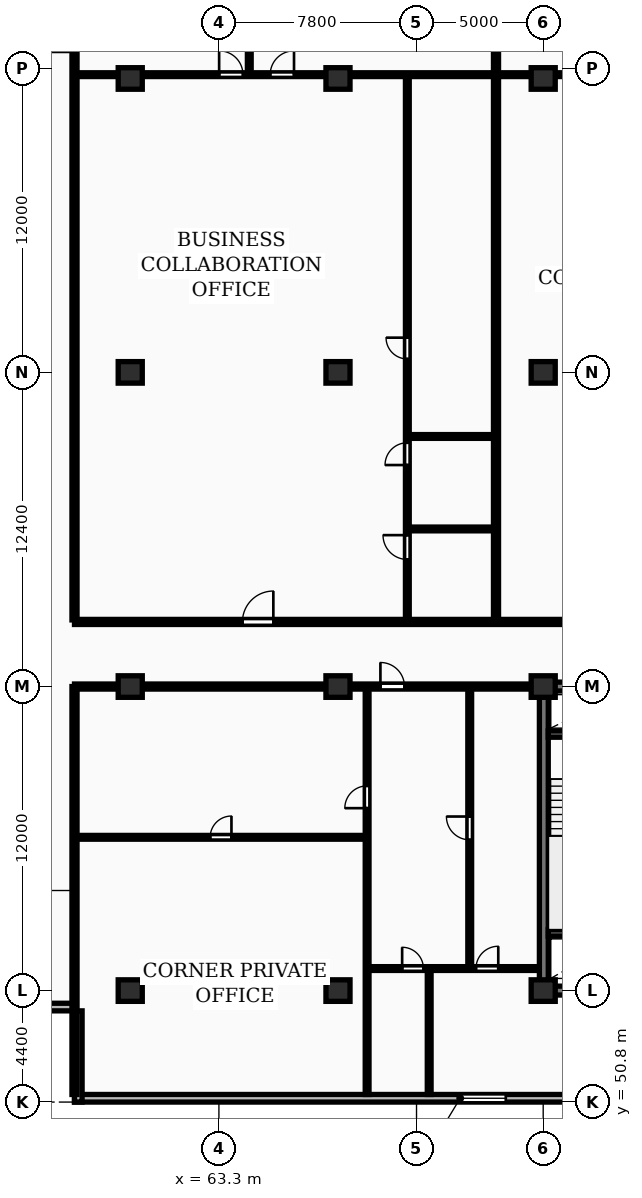
"""IFC4 building model, lengths in metres.
Left out: names, types, materials, properties, quantities, classifications, styles, units other than length and angle.
Written with IfcOpenShell. Run it as: python <this file> out.ifc"""

import sys

from ifc_helpers import new_model, si_unit, direction, frame, frame_2d, origin, origin_2d, place, context, subcontext, project, spatial, rectangle, extrude, element, fill, save


model = new_model("IFC4")
c1 = context("Model", 3, precision=1e-05, world=origin(), true_north=direction((0.0, 1.0)))
c2 = subcontext(c1, "Body", "Model", "MODEL_VIEW")
j1 = project(units=[si_unit("LENGTHUNIT", "METRE"), si_unit("PLANEANGLEUNIT", "RADIAN")], contexts=[c1])
p1 = place(None, origin())
s1 = spatial("IfcSite", under=j1, at=p1, CompositionType="ELEMENT")
p2 = place(p1, origin())
s2 = spatial("IfcBuilding", under=s1, at=p2, CompositionType="ELEMENT")
p3 = place(p2, frame((0.0, 0.0, 132.8)))
s3 = spatial("IfcBuildingStorey", under=s2, at=p3, CompositionType="ELEMENT", Elevation=132.8)
for number, where, z_axis, x_axis in (
    (1, (59.8, 55.2, 0.0), (0.0, 0.0, 1.0), (1.0, 0.0, 0.0)),
    (2, (59.8, 67.2, 0.0), (0.0, 0.0, 1.0), (1.0, 0.0, 0.0)),
    (3, (59.8, 79.6, 0.0), (0.0, 0.0, 1.0), (1.0, 0.0, 0.0)),
    (4, (59.8, 91.2, 0.0), (0.0, 0.0, 1.0), (1.0, 0.0, 0.0)),
    (5, (68.0, 55.2, 0.0), (0.0, 0.0, 1.0), (1.0, 0.0, 0.0)),
    (6, (68.0, 67.2, 0.0), (0.0, 0.0, 1.0), (1.0, 0.0, 0.0)),
    (7, (68.0, 79.6, 0.0), (0.0, 0.0, 1.0), (1.0, 0.0, 0.0)),
    (8, (68.0, 91.2, 0.0), (0.0, 0.0, 1.0), (1.0, 0.0, 0.0)),
    (9, (76.1, 55.2, 0.0), (0.0, 0.0, 1.0), (1.0, 0.0, 0.0)),
    (10, (76.1, 67.2, 0.0), (0.0, 0.0, 1.0), (1.0, 0.0, 0.0)),
    (11, (76.1, 79.6, 0.0), (0.0, 0.0, 1.0), (1.0, 0.0, 0.0)),
    (12, (76.1, 91.2, 0.0), (0.0, 0.0, 1.0), (1.0, 0.0, 0.0)),
):
    element("IfcColumn", number, at=place(p3, frame(where, z_axis=z_axis, x_axis=x_axis)), inside=s3, PredefinedType="COLUMN", context=c2, shape_type="SweptSolid", body=[
        extrude(rectangle(XDim=0.95, YDim=0.85, at=origin_2d()), origin(), (0.0, 0.0, 1.0), 3.25),
    ])
p4 = place(p3, frame((57.6, 50.95, 0.0), z_axis=(0.0, 0.0, 1.0), x_axis=(1.0, 0.0, 0.0)))
e13 = element("IfcWall", 13, at=p4, inside=s3, PredefinedType="STANDARD", context=c2, shape_type="SweptSolid", body=[
    extrude(rectangle(XDim=73.0, YDim=0.3, at=frame_2d((36.5, 0.0))), origin(), (0.0, 0.0, 1.0), 2.97),
])
p5 = place(p4, frame((15.225, 0.0, 0.85)))
e14 = element("IfcOpeningElement", 14, at=p5, cuts=e13, PredefinedType="OPENING", context=c2, shape_type="SweptSolid", body=[
    extrude(rectangle(XDim=1.8, YDim=1.8, at=frame_2d((0.9, 0.9))), frame((0.0, 0.16, 0.0), z_axis=(0.0, -1.0, 0.0), x_axis=(1.0, 0.0, 0.0)), (0.0, 0.0, 1.0), 0.32),
])
p6 = place(p4, frame((58.575, 0.0, 0.85)))
e15 = element("IfcOpeningElement", 15, at=p6, cuts=e13, PredefinedType="OPENING", context=c2, shape_type="SweptSolid", body=[
    extrude(rectangle(XDim=1.8, YDim=1.8, at=frame_2d((0.9, 0.9))), frame((0.0, 0.16, 0.0), z_axis=(0.0, -1.0, 0.0), x_axis=(1.0, 0.0, 0.0)), (0.0, 0.0, 1.0), 0.32),
])
p7 = place(p3, frame((54.0, 54.55, 0.0), z_axis=(0.0, 0.0, 1.0), x_axis=(1.0, 0.0, 0.0)))
e16 = element("IfcWall", 16, at=p7, inside=s3, PredefinedType="STANDARD", context=c2, shape_type="SweptSolid", body=[
    extrude(rectangle(XDim=3.6, YDim=0.3, at=frame_2d((1.8, 0.0))), origin(), (0.0, 0.0, 1.0), 2.97),
])
p8 = place(p3, frame((57.75, 54.4, 0.0), z_axis=(0.0, 0.0, 1.0), x_axis=(0.0, -1.0, 0.0)))
e17 = element("IfcWall", 17, at=p8, inside=s3, PredefinedType="STANDARD", context=c2, shape_type="SweptSolid", body=[
    extrude(rectangle(XDim=3.6, YDim=0.3, at=frame_2d((1.8, 0.0))), origin(), (0.0, 0.0, 1.0), 2.97),
])
p9 = place(p3, frame((75.95, 55.2, 0.0), z_axis=(0.0, 0.0, 1.0), x_axis=(1.0, 0.0, 0.0)))
e18 = element("IfcWall", 18, at=p9, inside=s3, PredefinedType="SHEAR", context=c2, shape_type="SweptSolid", body=[
    extrude(rectangle(XDim=36.3, YDim=0.35, at=frame_2d((18.15, 0.0))), origin(), (0.0, 0.0, 1.0), 3.25),
])
p10 = place(p3, frame((76.125, 55.375, 0.0), z_axis=(0.0, 0.0, 1.0), x_axis=(0.0, 1.0, 0.0)))
e19 = element("IfcWall", 19, at=p10, inside=s3, PredefinedType="SHEAR", context=c2, shape_type="SweptSolid", body=[
    extrude(rectangle(XDim=11.65, YDim=0.35, at=frame_2d((5.825, 0.0))), origin(), (0.0, 0.0, 1.0), 3.25),
])
p11 = place(p3, frame((75.95, 67.2, 0.0), z_axis=(0.0, 0.0, 1.0), x_axis=(1.0, 0.0, 0.0)))
e20 = element("IfcWall", 20, at=p11, inside=s3, PredefinedType="SHEAR", context=c2, shape_type="SweptSolid", body=[
    extrude(rectangle(XDim=36.3, YDim=0.35, at=frame_2d((18.15, 0.0))), origin(), (0.0, 0.0, 1.0), 3.25),
])
p12 = place(p11, frame((5.25, 0.0, 0.0)))
e21 = element("IfcOpeningElement", 21, at=p12, cuts=e20, PredefinedType="OPENING", context=c2, shape_type="SweptSolid", body=[
    extrude(rectangle(XDim=1.0, YDim=2.15, at=frame_2d((0.5, 1.075))), frame((0.0, 0.185, 0.0), z_axis=(0.0, -1.0, 0.0), x_axis=(1.0, 0.0, 0.0)), (0.0, 0.0, 1.0), 0.37),
])
p13 = place(p11, frame((21.6, 0.0, 0.0)))
e22 = element("IfcOpeningElement", 22, at=p13, cuts=e20, PredefinedType="OPENING", context=c2, shape_type="SweptSolid", body=[
    extrude(rectangle(XDim=1.5, YDim=2.2, at=frame_2d((0.75, 1.1))), frame((0.0, 0.185, 0.0), z_axis=(0.0, -1.0, 0.0), x_axis=(1.0, 0.0, 0.0)), (0.0, 0.0, 1.0), 0.37),
])
p14 = place(p11, frame((30.45, 0.0, 0.0)))
e23 = element("IfcOpeningElement", 23, at=p14, cuts=e20, PredefinedType="OPENING", context=c2, shape_type="SweptSolid", body=[
    extrude(rectangle(XDim=1.0, YDim=2.15, at=frame_2d((0.5, 1.075))), frame((0.0, 0.185, 0.0), z_axis=(0.0, -1.0, 0.0), x_axis=(1.0, 0.0, 0.0)), (0.0, 0.0, 1.0), 0.37),
])
for number, where, z_axis, x_axis in (
    (24, (76.3, 57.475, 0.0), (0.0, 0.0, 1.0), (1.0, 0.0, 0.0)),
    (25, (76.3, 65.325, 0.0), (0.0, 0.0, 1.0), (1.0, 0.0, 0.0)),
):
    element("IfcWall", number, at=place(p3, frame(where, z_axis=z_axis, x_axis=x_axis)), inside=s3, PredefinedType="SHEAR", context=c2, shape_type="SweptSolid", body=[
        extrude(rectangle(XDim=3.24, YDim=0.25, at=frame_2d((1.62, 0.0))), origin(), (0.0, 0.0, 1.0), 3.25),
    ])
p15 = place(p3, frame((57.6, 51.1, 0.0), z_axis=(0.0, 0.0, 1.0), x_axis=(0.0, 1.0, 0.0)))
e26 = element("IfcWall", 26, at=p15, inside=s3, PredefinedType="PARTITIONING", context=c2, shape_type="SweptSolid", body=[
    extrude(rectangle(XDim=16.1, YDim=0.2, at=frame_2d((8.05, 0.0))), origin(), (0.0, 0.0, 1.0), 2.97),
])
p16 = place(p3, frame((57.6, 61.25, 0.0), z_axis=(0.0, 0.0, 1.0), x_axis=(1.0, 0.0, 0.0)))
e27 = element("IfcWall", 27, at=p16, inside=s3, PredefinedType="PARTITIONING", context=c2, shape_type="SweptSolid", body=[
    extrude(rectangle(XDim=11.55, YDim=0.15, at=frame_2d((5.775, 0.0))), origin(), (0.0, 0.0, 1.0), 2.97),
])
p17 = place(p16, frame((5.355, 0.0, 0.0)))
e28 = element("IfcOpeningElement", 28, at=p17, cuts=e27, PredefinedType="OPENING", context=c2, shape_type="SweptSolid", body=[
    extrude(rectangle(XDim=0.84, YDim=2.04, at=frame_2d((0.42, 1.02))), frame((0.0, 0.085, 0.0), z_axis=(0.0, -1.0, 0.0), x_axis=(1.0, 0.0, 0.0)), (0.0, 0.0, 1.0), 0.17),
])
p18 = place(p3, frame((69.15, 51.1, 0.0), z_axis=(0.0, 0.0, 1.0), x_axis=(0.0, 1.0, 0.0)))
e29 = element("IfcWall", 29, at=p18, inside=s3, PredefinedType="PARTITIONING", context=c2, shape_type="SweptSolid", body=[
    extrude(rectangle(XDim=16.05, YDim=0.15, at=frame_2d((8.025, 0.0))), origin(), (0.0, 0.0, 1.0), 2.97),
])
p19 = place(p18, frame((11.3, 0.0, 0.0)))
e30 = element("IfcOpeningElement", 30, at=p19, cuts=e29, PredefinedType="OPENING", context=c2, shape_type="SweptSolid", body=[
    extrude(rectangle(XDim=0.88, YDim=2.06, at=frame_2d((0.44, 1.03))), frame((0.0, 0.085, 0.0), z_axis=(0.0, -1.0, 0.0), x_axis=(1.0, 0.0, 0.0)), (0.0, 0.0, 1.0), 0.17),
])
p20 = place(p3, frame((73.2, 56.07, 0.0), z_axis=(0.0, 0.0, 1.0), x_axis=(0.0, 1.0, 0.0)))
e31 = element("IfcWall", 31, at=p20, inside=s3, PredefinedType="PARTITIONING", context=c2, shape_type="SweptSolid", body=[
    extrude(rectangle(XDim=11.08, YDim=0.15, at=frame_2d((5.54, 0.0))), origin(), (0.0, 0.0, 1.0), 2.97),
])
p21 = place(p20, frame((5.08, 0.0, 0.0)))
e32 = element("IfcOpeningElement", 32, at=p21, cuts=e31, PredefinedType="OPENING", context=c2, shape_type="SweptSolid", body=[
    extrude(rectangle(XDim=0.92, YDim=2.08, at=frame_2d((0.46, 1.04))), frame((0.0, 0.085, 0.0), z_axis=(0.0, -1.0, 0.0), x_axis=(1.0, 0.0, 0.0)), (0.0, 0.0, 1.0), 0.17),
])
p22 = place(p3, frame((71.6, 51.1, 0.0), z_axis=(0.0, 0.0, 1.0), x_axis=(0.0, 1.0, 0.0)))
e33 = element("IfcWall", 33, at=p22, inside=s3, PredefinedType="PARTITIONING", context=c2, shape_type="SweptSolid", body=[
    extrude(rectangle(XDim=4.97, YDim=0.15, at=frame_2d((2.485, 0.0))), origin(), (0.0, 0.0, 1.0), 2.97),
])
p23 = place(p3, frame((69.17, 56.07, 0.0), z_axis=(0.0, 0.0, 1.0), x_axis=(1.0, 0.0, 0.0)))
e34 = element("IfcWall", 34, at=p23, inside=s3, PredefinedType="PARTITIONING", context=c2, shape_type="SweptSolid", body=[
    extrude(rectangle(XDim=6.76, YDim=0.15, at=frame_2d((3.38, 0.0))), origin(), (0.0, 0.0, 1.0), 2.97),
])
p24 = place(p23, frame((1.362, 0.0, 0.0)))
e35 = element("IfcOpeningElement", 35, at=p24, cuts=e34, PredefinedType="OPENING", context=c2, shape_type="SweptSolid", body=[
    extrude(rectangle(XDim=0.84, YDim=2.04, at=frame_2d((0.42, 1.02))), frame((0.0, 0.085, 0.0), z_axis=(0.0, -1.0, 0.0), x_axis=(1.0, 0.0, 0.0)), (0.0, 0.0, 1.0), 0.17),
])
p25 = place(p23, frame((4.277, 0.0, 0.0)))
e36 = element("IfcOpeningElement", 36, at=p25, cuts=e34, PredefinedType="OPENING", context=c2, shape_type="SweptSolid", body=[
    extrude(rectangle(XDim=0.88, YDim=2.06, at=frame_2d((0.44, 1.03))), frame((0.0, 0.085, 0.0), z_axis=(0.0, -1.0, 0.0), x_axis=(1.0, 0.0, 0.0)), (0.0, 0.0, 1.0), 0.17),
])
p26 = place(p3, frame((57.6, 67.2, 0.0), z_axis=(0.0, 0.0, 1.0), x_axis=(1.0, 0.0, 0.0)))
e37 = element("IfcWall", 37, at=p26, inside=s3, PredefinedType="PARTITIONING", context=c2, shape_type="SweptSolid", body=[
    extrude(rectangle(XDim=18.35, YDim=0.2, at=frame_2d((9.175, 0.0))), origin(), (0.0, 0.0, 1.0), 2.433),
])
p27 = place(p26, frame((12.075, 0.0, 0.0)))
e38 = element("IfcOpeningElement", 38, at=p27, cuts=e37, PredefinedType="OPENING", context=c2, shape_type="SweptSolid", body=[
    extrude(rectangle(XDim=0.95, YDim=2.15, at=frame_2d((0.475, 1.075))), frame((0.0, 0.11, 0.0), z_axis=(0.0, -1.0, 0.0), x_axis=(1.0, 0.0, 0.0)), (0.0, 0.0, 1.0), 0.22),
])
for number, where, z_axis, x_axis in (
    (39, (57.6, 69.83, 0.0), (0.0, 0.0, 1.0), (0.0, 1.0, 0.0)),
    (40, (74.238, 69.83, 0.0), (0.0, 0.0, 1.0), (0.0, 1.0, 0.0)),
):
    element("IfcWall", number, at=place(p3, frame(where, z_axis=z_axis, x_axis=x_axis)), inside=s3, PredefinedType="PARTITIONING", context=c2, shape_type="SweptSolid", body=[
        extrude(rectangle(XDim=26.07, YDim=0.2, at=frame_2d((13.035, 0.0))), origin(), (0.0, 0.0, 1.0), 2.97),
    ])
for number, where, z_axis, x_axis in (
    (41, (70.798, 73.42, 0.0), (0.0, 0.0, 1.0), (1.0, 0.0, 0.0)),
    (42, (70.798, 77.07, 0.0), (0.0, 0.0, 1.0), (1.0, 0.0, 0.0)),
):
    element("IfcWall", number, at=place(p3, frame(where, z_axis=z_axis, x_axis=x_axis)), inside=s3, PredefinedType="PARTITIONING", context=c2, shape_type="SweptSolid", body=[
        extrude(rectangle(XDim=3.36, YDim=0.15, at=frame_2d((1.68, 0.0))), origin(), (0.0, 0.0, 1.0), 2.97),
    ])
p28 = place(p3, frame((70.738, 69.81, 0.0), z_axis=(0.0, 0.0, 1.0), x_axis=(0.0, 1.0, 0.0)))
e43 = element("IfcWall", 43, at=p28, inside=s3, PredefinedType="PARTITIONING", context=c2, shape_type="SweptSolid", body=[
    extrude(rectangle(XDim=21.48, YDim=0.15, at=frame_2d((10.74, 0.0))), origin(), (0.0, 0.0, 1.0), 2.97),
])
p29 = place(p28, frame((2.406, 0.0, 0.0)))
e44 = element("IfcOpeningElement", 44, at=p29, cuts=e43, PredefinedType="OPENING", context=c2, shape_type="SweptSolid", body=[
    extrude(rectangle(XDim=0.96, YDim=2.1, at=frame_2d((0.48, 1.05))), frame((0.0, 0.085, 0.0), z_axis=(0.0, -1.0, 0.0), x_axis=(1.0, 0.0, 0.0)), (0.0, 0.0, 1.0), 0.17),
])
p30 = place(p28, frame((6.133, 0.0, 0.0)))
e45 = element("IfcOpeningElement", 45, at=p30, cuts=e43, PredefinedType="OPENING", context=c2, shape_type="SweptSolid", body=[
    extrude(rectangle(XDim=0.88, YDim=2.06, at=frame_2d((0.44, 1.03))), frame((0.0, 0.085, 0.0), z_axis=(0.0, -1.0, 0.0), x_axis=(1.0, 0.0, 0.0)), (0.0, 0.0, 1.0), 0.17),
])
p31 = place(p28, frame((10.32, 0.0, 0.0)))
e46 = element("IfcOpeningElement", 46, at=p31, cuts=e43, PredefinedType="OPENING", context=c2, shape_type="SweptSolid", body=[
    extrude(rectangle(XDim=0.84, YDim=2.04, at=frame_2d((0.42, 1.02))), frame((0.0, 0.085, 0.0), z_axis=(0.0, -1.0, 0.0), x_axis=(1.0, 0.0, 0.0)), (0.0, 0.0, 1.0), 0.17),
])
p32 = place(p3, frame((64.499, 91.43, 0.0), z_axis=(0.0, 0.0, 1.0), x_axis=(0.0, 1.0, 0.0)))
e47 = element("IfcWall", 47, at=p32, inside=s3, PredefinedType="PARTITIONING", context=c2, shape_type="SweptSolid", body=[
    extrude(rectangle(XDim=4.47, YDim=0.15, at=frame_2d((2.235, 0.0))), origin(), (0.0, 0.0, 1.0), 2.97),
])
p33 = place(p3, frame((57.68, 91.35, 0.0), z_axis=(0.0, 0.0, 1.0), x_axis=(1.0, 0.0, 0.0)))
e48 = element("IfcWall", 48, at=p33, inside=s3, PredefinedType="PARTITIONING", context=c2, shape_type="SweptSolid", body=[
    extrude(rectangle(XDim=16.478, YDim=0.15, at=frame_2d((8.239, 0.0))), origin(), (0.0, 0.0, 1.0), 2.663),
])
p34 = place(p33, frame((5.629, 0.0, 0.0)))
e49 = element("IfcOpeningElement", 49, at=p34, cuts=e48, PredefinedType="OPENING", context=c2, shape_type="SweptSolid", body=[
    extrude(rectangle(XDim=0.94, YDim=2.1, at=frame_2d((0.47, 1.05))), frame((0.0, 0.085, 0.0), z_axis=(0.0, -1.0, 0.0), x_axis=(1.0, 0.0, 0.0)), (0.0, 0.0, 1.0), 0.17),
])
p35 = place(p33, frame((7.645, 0.0, 0.0)))
e50 = element("IfcOpeningElement", 50, at=p35, cuts=e48, PredefinedType="OPENING", context=c2, shape_type="SweptSolid", body=[
    extrude(rectangle(XDim=0.94, YDim=2.1, at=frame_2d((0.47, 1.05))), frame((0.0, 0.085, 0.0), z_axis=(0.0, -1.0, 0.0), x_axis=(1.0, 0.0, 0.0)), (0.0, 0.0, 1.0), 0.17),
])
p36 = place(p3, frame((74.317, 91.35, 0.0), z_axis=(0.0, 0.0, 1.0), x_axis=(1.0, 0.0, 0.0)))
e51 = element("IfcWall", 51, at=p36, inside=s3, PredefinedType="PARTITIONING", context=c2, shape_type="SweptSolid", body=[
    extrude(rectangle(XDim=18.44, YDim=0.15, at=frame_2d((9.22, 0.0))), origin(), (0.0, 0.0, 1.0), 2.663),
])
p37 = place(p36, frame((6.725, 0.0, 0.0)))
e52 = element("IfcOpeningElement", 52, at=p37, cuts=e51, PredefinedType="OPENING", context=c2, shape_type="SweptSolid", body=[
    extrude(rectangle(XDim=0.94, YDim=2.1, at=frame_2d((0.47, 1.05))), frame((0.0, 0.085, 0.0), z_axis=(0.0, -1.0, 0.0), x_axis=(1.0, 0.0, 0.0)), (0.0, 0.0, 1.0), 0.17),
])
p38 = place(p36, frame((11.938, 0.0, 0.0)))
e53 = element("IfcOpeningElement", 53, at=p38, cuts=e51, PredefinedType="OPENING", context=c2, shape_type="SweptSolid", body=[
    extrude(rectangle(XDim=0.94, YDim=2.1, at=frame_2d((0.47, 1.05))), frame((0.0, 0.085, 0.0), z_axis=(0.0, -1.0, 0.0), x_axis=(1.0, 0.0, 0.0)), (0.0, 0.0, 1.0), 0.17),
])
p39 = place(p3, frame((57.6, 69.75, 0.0), z_axis=(0.0, 0.0, 1.0), x_axis=(1.0, 0.0, 0.0)))
e54 = element("IfcWall", 54, at=p39, inside=s3, PredefinedType="PARTITIONING", context=c2, shape_type="SweptSolid", body=[
    extrude(rectangle(XDim=73.0, YDim=0.2, at=frame_2d((36.5, 0.0))), origin(), (0.0, 0.0, 1.0), 2.97),
])
p40 = place(p39, frame((6.629, 0.0, 0.0)))
e55 = element("IfcOpeningElement", 55, at=p40, cuts=e54, PredefinedType="OPENING", context=c2, shape_type="SweptSolid", body=[
    extrude(rectangle(XDim=1.22, YDim=2.18, at=frame_2d((0.61, 1.09))), frame((0.0, 0.11, 0.0), z_axis=(0.0, -1.0, 0.0), x_axis=(1.0, 0.0, 0.0)), (0.0, 0.0, 1.0), 0.22),
])
p41 = place(p39, frame((24.022, 0.0, 0.0)))
e56 = element("IfcOpeningElement", 56, at=p41, cuts=e54, PredefinedType="OPENING", context=c2, shape_type="SweptSolid", body=[
    extrude(rectangle(XDim=1.22, YDim=2.18, at=frame_2d((0.61, 1.09))), frame((0.0, 0.11, 0.0), z_axis=(0.0, -1.0, 0.0), x_axis=(1.0, 0.0, 0.0)), (0.0, 0.0, 1.0), 0.22),
])
p42 = place(p39, frame((37.768, 0.0, 0.0)))
e57 = element("IfcOpeningElement", 57, at=p42, cuts=e54, PredefinedType="OPENING", context=c2, shape_type="SweptSolid", body=[
    extrude(rectangle(XDim=0.95, YDim=2.15, at=frame_2d((0.475, 1.075))), frame((0.0, 0.11, 0.0), z_axis=(0.0, -1.0, 0.0), x_axis=(1.0, 0.0, 0.0)), (0.0, 0.0, 1.0), 0.22),
])
p43 = place(p39, frame((57.57, 0.0, 0.0)))
e58 = element("IfcOpeningElement", 58, at=p43, cuts=e54, PredefinedType="OPENING", context=c2, shape_type="SweptSolid", body=[
    extrude(rectangle(XDim=0.95, YDim=2.15, at=frame_2d((0.475, 1.075))), frame((0.0, 0.11, 0.0), z_axis=(0.0, -1.0, 0.0), x_axis=(1.0, 0.0, 0.0)), (0.0, 0.0, 1.0), 0.22),
])
p44 = place(p5, origin())
e59 = element("IfcWindow", 59, at=p44, inside=s3, PartitioningType="SINGLE_PANEL", PredefinedType="WINDOW", context=c2, shape_type="SweptSolid", body=[
    extrude(rectangle(XDim=1.8, YDim=1.8, at=frame_2d((0.9, 0.9))), frame((0.0, 0.03, 0.0), z_axis=(0.0, -1.0, 0.0), x_axis=(1.0, 0.0, 0.0)), (0.0, 0.0, 1.0), 0.06),
])
fill(e14, e59)
p45 = place(p17, origin())
e60 = element("IfcDoor", 60, at=p45, inside=s3, OperationType="SINGLE_SWING_RIGHT", PredefinedType="DOOR", context=c2, shape_type="SweptSolid", body=[
    extrude(rectangle(XDim=0.84, YDim=2.04, at=frame_2d((0.42, 1.02))), frame((0.0, 0.025, 0.0), z_axis=(0.0, -1.0, 0.0), x_axis=(1.0, 0.0, 0.0)), (0.0, 0.0, 1.0), 0.05),
])
fill(e28, e60)
p46 = place(p19, origin())
e61 = element("IfcDoor", 61, at=p46, inside=s3, OperationType="SINGLE_SWING_LEFT", PredefinedType="DOOR", context=c2, shape_type="SweptSolid", body=[
    extrude(rectangle(XDim=0.88, YDim=2.06, at=frame_2d((0.44, 1.03))), frame((0.0, 0.025, 0.0), z_axis=(0.0, -1.0, 0.0), x_axis=(1.0, 0.0, 0.0)), (0.0, 0.0, 1.0), 0.05),
])
fill(e30, e61)
p47 = place(p21, origin())
e62 = element("IfcDoor", 62, at=p47, inside=s3, OperationType="SINGLE_SWING_RIGHT", PredefinedType="DOOR", context=c2, shape_type="SweptSolid", body=[
    extrude(rectangle(XDim=0.92, YDim=2.08, at=frame_2d((0.46, 1.04))), frame((0.0, 0.025, 0.0), z_axis=(0.0, -1.0, 0.0), x_axis=(1.0, 0.0, 0.0)), (0.0, 0.0, 1.0), 0.05),
])
fill(e32, e62)
p48 = place(p24, origin())
e63 = element("IfcDoor", 63, at=p48, inside=s3, OperationType="SINGLE_SWING_LEFT", PredefinedType="DOOR", context=c2, shape_type="SweptSolid", body=[
    extrude(rectangle(XDim=0.84, YDim=2.04, at=frame_2d((0.42, 1.02))), frame((0.0, 0.025, 0.0), z_axis=(0.0, -1.0, 0.0), x_axis=(1.0, 0.0, 0.0)), (0.0, 0.0, 1.0), 0.05),
])
fill(e35, e63)
p49 = place(p25, origin())
e64 = element("IfcDoor", 64, at=p49, inside=s3, OperationType="SINGLE_SWING_RIGHT", PredefinedType="DOOR", context=c2, shape_type="SweptSolid", body=[
    extrude(rectangle(XDim=0.88, YDim=2.06, at=frame_2d((0.44, 1.03))), frame((0.0, 0.025, 0.0), z_axis=(0.0, -1.0, 0.0), x_axis=(1.0, 0.0, 0.0)), (0.0, 0.0, 1.0), 0.05),
])
fill(e36, e64)
p50 = place(p27, origin())
e65 = element("IfcDoor", 65, at=p50, inside=s3, OperationType="SINGLE_SWING_LEFT", PredefinedType="DOOR", context=c2, shape_type="SweptSolid", body=[
    extrude(rectangle(XDim=0.95, YDim=2.15, at=frame_2d((0.475, 1.075))), frame((0.0, 0.025, 0.0), z_axis=(0.0, -1.0, 0.0), x_axis=(1.0, 0.0, 0.0)), (0.0, 0.0, 1.0), 0.05),
])
fill(e38, e65)
p51 = place(p29, origin())
e66 = element("IfcDoor", 66, at=p51, inside=s3, OperationType="SINGLE_SWING_RIGHT", PredefinedType="DOOR", context=c2, shape_type="SweptSolid", body=[
    extrude(rectangle(XDim=0.96, YDim=2.1, at=frame_2d((0.48, 1.05))), frame((0.0, 0.025, 0.0), z_axis=(0.0, -1.0, 0.0), x_axis=(1.0, 0.0, 0.0)), (0.0, 0.0, 1.0), 0.05),
])
fill(e44, e66)
p52 = place(p30, origin())
e67 = element("IfcDoor", 67, at=p52, inside=s3, OperationType="SINGLE_SWING_LEFT", PredefinedType="DOOR", context=c2, shape_type="SweptSolid", body=[
    extrude(rectangle(XDim=0.88, YDim=2.06, at=frame_2d((0.44, 1.03))), frame((0.0, 0.025, 0.0), z_axis=(0.0, -1.0, 0.0), x_axis=(1.0, 0.0, 0.0)), (0.0, 0.0, 1.0), 0.05),
])
fill(e45, e67)
p53 = place(p31, origin())
e68 = element("IfcDoor", 68, at=p53, inside=s3, OperationType="SINGLE_SWING_RIGHT", PredefinedType="DOOR", context=c2, shape_type="SweptSolid", body=[
    extrude(rectangle(XDim=0.84, YDim=2.04, at=frame_2d((0.42, 1.02))), frame((0.0, 0.025, 0.0), z_axis=(0.0, -1.0, 0.0), x_axis=(1.0, 0.0, 0.0)), (0.0, 0.0, 1.0), 0.05),
])
fill(e46, e68)
p54 = place(p34, origin())
e69 = element("IfcDoor", 69, at=p54, inside=s3, OperationType="SINGLE_SWING_LEFT", PredefinedType="DOOR", context=c2, shape_type="SweptSolid", body=[
    extrude(rectangle(XDim=0.94, YDim=2.1, at=frame_2d((0.47, 1.05))), frame((0.0, 0.025, 0.0), z_axis=(0.0, -1.0, 0.0), x_axis=(1.0, 0.0, 0.0)), (0.0, 0.0, 1.0), 0.05),
])
fill(e49, e69)
p55 = place(p35, origin())
e70 = element("IfcDoor", 70, at=p55, inside=s3, OperationType="SINGLE_SWING_RIGHT", PredefinedType="DOOR", context=c2, shape_type="SweptSolid", body=[
    extrude(rectangle(XDim=0.94, YDim=2.1, at=frame_2d((0.47, 1.05))), frame((0.0, 0.025, 0.0), z_axis=(0.0, -1.0, 0.0), x_axis=(1.0, 0.0, 0.0)), (0.0, 0.0, 1.0), 0.05),
])
fill(e50, e70)
p56 = place(p40, origin())
e71 = element("IfcDoor", 71, at=p56, inside=s3, OperationType="SINGLE_SWING_RIGHT", PredefinedType="DOOR", context=c2, shape_type="SweptSolid", body=[
    extrude(rectangle(XDim=1.22, YDim=2.18, at=frame_2d((0.61, 1.09))), frame((0.0, 0.025, 0.0), z_axis=(0.0, -1.0, 0.0), x_axis=(1.0, 0.0, 0.0)), (0.0, 0.0, 1.0), 0.05),
])
fill(e55, e71)
save(model, sys.argv[1])
